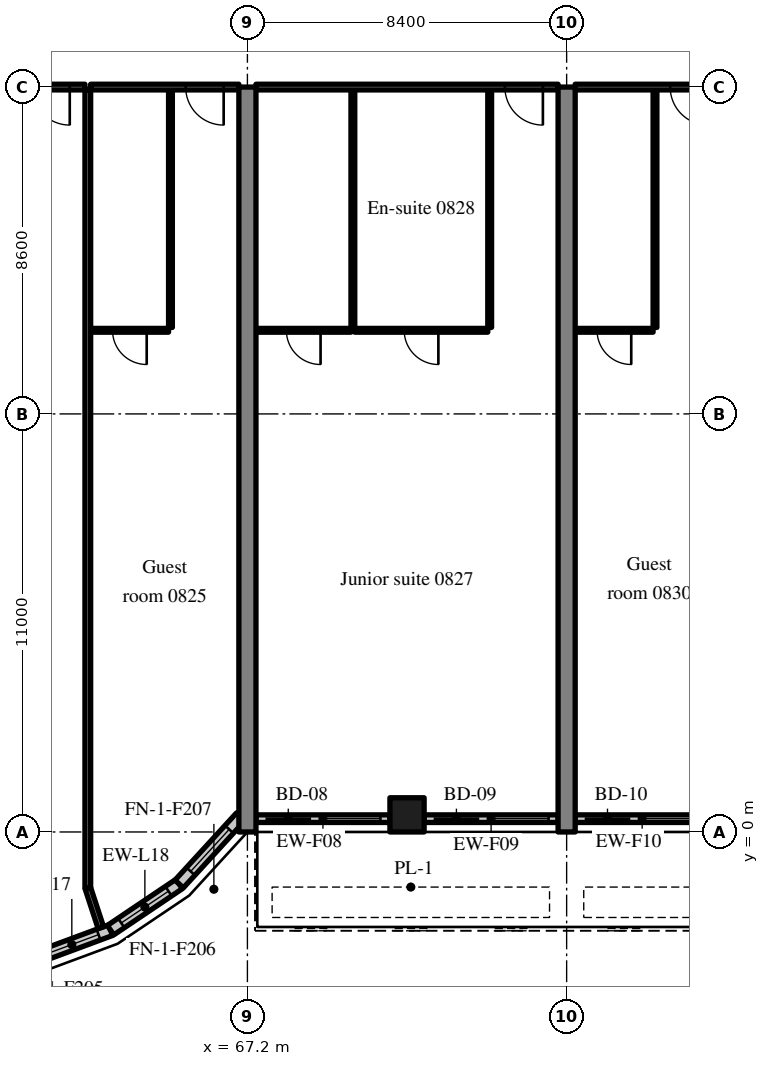
"""IFC4 building model, lengths in metres.
Left out: names, types, materials, properties, quantities, classifications, styles, units other than length and angle.
Written with IfcOpenShell. Run it as: python <this file> out.ifc"""

import sys

from ifc_helpers import new_model, si_unit, direction, frame, frame_2d, origin, origin_2d, place, context, subcontext, project, spatial, rectangle, extrude, source, transform, mapped, element, fill, save


model = new_model("IFC4")
c1 = context("Model", 3, precision=1e-05, world=origin(), true_north=direction((0.0, 1.0)))
c2 = subcontext(c1, "Body", "Model", "MODEL_VIEW")
j1 = project(units=[si_unit("LENGTHUNIT", "METRE"), si_unit("PLANEANGLEUNIT", "RADIAN")], contexts=[c1])
p1 = place(None, origin())
s1 = spatial("IfcSite", under=j1, at=p1, CompositionType="ELEMENT")
p2 = place(p1, origin())
s2 = spatial("IfcBuilding", under=s1, at=p2, CompositionType="ELEMENT")
p3 = place(p2, frame((0.0, 0.0, 39.2)))
s3 = spatial("IfcBuildingStorey", under=s2, at=p3, CompositionType="ELEMENT", Elevation=39.2)
m1 = source(origin(), c2, "Body", "SweptSolid", [
    extrude(rectangle(XDim=19.6, YDim=0.45, at=frame_2d((9.8, 0.0))), origin(), (0.0, 0.0, 1.0), 3.52),
])
for number, where, z_axis, x_axis in (
    (1, (67.2, 0.0, 0.0), (0.0, 0.0, 1.0), (0.0, 1.0, 0.0)),
    (2, (75.6, 0.0, 0.0), (0.0, 0.0, 1.0), (0.0, 1.0, 0.0)),
):
    element("IfcWall", number, at=place(p3, frame(where, z_axis=z_axis, x_axis=x_axis)), inside=s3, PredefinedType="SHEAR", context=c2, shape_type="MappedRepresentation", body=[
        mapped(m1, transform((0.0, 0.0, 0.0), scale=1.0)),
    ])
m2 = source(origin(), c2, "Body", "SweptSolid", [
    extrude(rectangle(XDim=0.9, YDim=0.9, at=origin_2d()), origin(), (0.0, 0.0, 1.0), 3.52),
])
p4 = place(p3, frame((71.4, 0.45, 0.0), z_axis=(0.0, 0.0, 1.0), x_axis=(1.0, 0.0, 0.0)))
e3 = element("IfcColumn", 3, at=p4, inside=s3, PredefinedType="COLUMN", context=c2, shape_type="MappedRepresentation", body=[
    mapped(m2, transform((0.0, 0.0, 0.0), scale=1.0)),
])
m3 = source(origin(), c2, "Body", "SweptSolid", [
    extrude(rectangle(XDim=2.176, YDim=0.3, at=frame_2d((1.088, 0.0))), origin(), (0.0, 0.0, 1.0), 3.52),
])
p5 = place(p3, frame((61.56, -3.34, 0.0), z_axis=(0.0, 0.0, 1.0), x_axis=(0.937531979054, 0.347899106424, 0.0)))
e4 = element("IfcWall", 4, at=p5, inside=s3, PredefinedType="SOLIDWALL", context=c2, shape_type="MappedRepresentation", body=[
    mapped(m3, transform((0.0, 0.0, 0.0), scale=1.0)),
])
m4 = source(origin(), c2, "Body", "SweptSolid", [
    extrude(rectangle(XDim=1.5, YDim=2.0, at=frame_2d((0.75, 1.0))), frame((0.0, 0.16, 0.0), z_axis=(0.0, -1.0, 0.0), x_axis=(1.0, 0.0, 0.0)), (0.0, 0.0, 1.0), 0.32),
])
p6 = place(p5, frame((0.338, 0.0, 0.9)))
e5 = element("IfcOpeningElement", 5, at=p6, cuts=e4, PredefinedType="OPENING", context=c2, shape_type="MappedRepresentation", body=[
    mapped(m4, transform((0.0, 0.0, 0.0), scale=1.0)),
])
m5 = source(origin(), c2, "Body", "SweptSolid", [
    extrude(rectangle(XDim=2.176, YDim=0.3, at=frame_2d((1.088, 0.0))), origin(), (0.0, 0.0, 1.0), 3.52),
])
p7 = place(p3, frame((63.599, -2.583, 0.0), z_axis=(0.0, 0.0, 1.0), x_axis=(0.829625727223, 0.558319937607, 0.0)))
e6 = element("IfcWall", 6, at=p7, inside=s3, PredefinedType="SOLIDWALL", context=c2, shape_type="MappedRepresentation", body=[
    mapped(m5, transform((0.0, 0.0, 0.0), scale=1.0)),
])
p8 = place(p7, frame((0.338, 0.0, 0.9)))
e7 = element("IfcOpeningElement", 7, at=p8, cuts=e6, PredefinedType="OPENING", context=c2, shape_type="MappedRepresentation", body=[
    mapped(m4, transform((0.0, 0.0, 0.0), scale=1.0)),
])
m6 = source(origin(), c2, "Body", "SweptSolid", [
    extrude(rectangle(XDim=2.398, YDim=0.3, at=frame_2d((1.199, 0.0))), origin(), (0.0, 0.0, 1.0), 3.52),
])
p9 = place(p3, frame((65.404, -1.369, 0.0), z_axis=(0.0, 0.0, 1.0), x_axis=(0.675374189419, 0.737475222815, 0.0)))
e8 = element("IfcWall", 8, at=p9, inside=s3, PredefinedType="SOLIDWALL", context=c2, shape_type="MappedRepresentation", body=[
    mapped(m6, transform((0.0, 0.0, 0.0), scale=1.0)),
])
p10 = place(p9, frame((0.449, 0.0, 0.9)))
e9 = element("IfcOpeningElement", 9, at=p10, cuts=e8, PredefinedType="OPENING", context=c2, shape_type="MappedRepresentation", body=[
    mapped(m4, transform((0.0, 0.0, 0.0), scale=1.0)),
])
m7 = source(origin(), c2, "Body", "SweptSolid", [
    extrude(rectangle(XDim=3.525, YDim=0.2, at=frame_2d((1.762, 0.0))), origin(), (0.0, 0.0, 1.0), 2.77),
])
p11 = place(p3, frame((67.425, 0.35, 0.0), z_axis=(0.0, 0.0, 1.0), x_axis=(1.0, 0.0, 0.0)))
e10 = element("IfcWall", 10, at=p11, inside=s3, PredefinedType="SOLIDWALL", context=c2, shape_type="MappedRepresentation", body=[
    mapped(m7, transform((0.0, 0.0, 0.0), scale=1.0)),
])
m8 = source(origin(), c2, "Body", "SweptSolid", [
    extrude(rectangle(XDim=1.2, YDim=2.4, at=frame_2d((0.6, 1.2))), frame((0.0, 0.11, 0.0), z_axis=(0.0, -1.0, 0.0), x_axis=(1.0, 0.0, 0.0)), (0.0, 0.0, 1.0), 0.22),
])
p12 = place(p11, frame((0.25, 0.0, 0.0)))
e11 = element("IfcOpeningElement", 11, at=p12, cuts=e10, PredefinedType="OPENING", context=c2, shape_type="MappedRepresentation", body=[
    mapped(m8, transform((0.0, 0.0, 0.0), scale=1.0)),
])
m9 = source(origin(), c2, "Body", "SweptSolid", [
    extrude(rectangle(XDim=1.5, YDim=1.5, at=frame_2d((0.75, 0.75))), frame((0.0, 0.11, 0.0), z_axis=(0.0, -1.0, 0.0), x_axis=(1.0, 0.0, 0.0)), (0.0, 0.0, 1.0), 0.22),
])
p13 = place(p11, frame((1.775, 0.0, 0.9)))
e12 = element("IfcOpeningElement", 12, at=p13, cuts=e10, PredefinedType="OPENING", context=c2, shape_type="MappedRepresentation", body=[
    mapped(m9, transform((0.0, 0.0, 0.0), scale=1.0)),
])
p14 = place(p3, frame((71.85, 0.35, 0.0), z_axis=(0.0, 0.0, 1.0), x_axis=(1.0, 0.0, 0.0)))
e13 = element("IfcWall", 13, at=p14, inside=s3, PredefinedType="SOLIDWALL", context=c2, shape_type="MappedRepresentation", body=[
    mapped(m7, transform((0.0, 0.0, 0.0), scale=1.0)),
])
p15 = place(p14, frame((0.25, 0.0, 0.0)))
e14 = element("IfcOpeningElement", 14, at=p15, cuts=e13, PredefinedType="OPENING", context=c2, shape_type="MappedRepresentation", body=[
    mapped(m8, transform((0.0, 0.0, 0.0), scale=1.0)),
])
p16 = place(p14, frame((1.775, 0.0, 0.9)))
e15 = element("IfcOpeningElement", 15, at=p16, cuts=e13, PredefinedType="OPENING", context=c2, shape_type="MappedRepresentation", body=[
    mapped(m9, transform((0.0, 0.0, 0.0), scale=1.0)),
])
m10 = source(origin(), c2, "Body", "SweptSolid", [
    extrude(rectangle(XDim=3.525, YDim=0.2, at=frame_2d((1.763, 0.0))), origin(), (0.0, 0.0, 1.0), 2.77),
])
p17 = place(p3, frame((75.825, 0.35, 0.0), z_axis=(0.0, 0.0, 1.0), x_axis=(1.0, 0.0, 0.0)))
e16 = element("IfcWall", 16, at=p17, inside=s3, PredefinedType="SOLIDWALL", context=c2, shape_type="MappedRepresentation", body=[
    mapped(m10, transform((0.0, 0.0, 0.0), scale=1.0)),
])
p18 = place(p17, frame((0.25, 0.0, 0.0)))
e17 = element("IfcOpeningElement", 17, at=p18, cuts=e16, PredefinedType="OPENING", context=c2, shape_type="MappedRepresentation", body=[
    mapped(m8, transform((0.0, 0.0, 0.0), scale=1.0)),
])
p19 = place(p17, frame((1.775, 0.0, 0.9)))
e18 = element("IfcOpeningElement", 18, at=p19, cuts=e16, PredefinedType="OPENING", context=c2, shape_type="MappedRepresentation", body=[
    mapped(m9, transform((0.0, 0.0, 0.0), scale=1.0)),
])
m11 = source(origin(), c2, "Body", "SweptSolid", [
    extrude(rectangle(XDim=3.9, YDim=0.15, at=frame_2d((1.95, 0.0))), origin(), (0.0, 0.0, 1.0), 2.82),
])
p20 = place(p3, frame((59.025, 19.6, 0.0), z_axis=(0.0, 0.0, 1.0), x_axis=(1.0, 0.0, 0.0)))
e19 = element("IfcWall", 19, at=p20, inside=s3, PredefinedType="PARTITIONING", context=c2, shape_type="MappedRepresentation", body=[
    mapped(m11, transform((0.0, 0.0, 0.0), scale=1.0)),
])
m12 = source(origin(), c2, "Body", "SweptSolid", [
    extrude(rectangle(XDim=1.0, YDim=2.1, at=frame_2d((0.5, 1.05))), frame((0.0, 0.085, 0.0), z_axis=(0.0, -1.0, 0.0), x_axis=(1.0, 0.0, 0.0)), (0.0, 0.0, 1.0), 0.17),
])
p21 = place(p20, frame((2.5, 0.0, 0.0)))
e20 = element("IfcOpeningElement", 20, at=p21, cuts=e19, PredefinedType="OPENING", context=c2, shape_type="MappedRepresentation", body=[
    mapped(m12, transform((0.0, 0.0, 0.0), scale=1.0)),
])
m13 = source(origin(), c2, "Body", "SweptSolid", [
    extrude(rectangle(XDim=6.25, YDim=0.1, at=frame_2d((3.125, 0.0))), origin(), (0.0, 0.0, 1.0), 3.52),
])
p22 = place(p3, frame((65.175, 13.275, 0.0), z_axis=(0.0, 0.0, 1.0), x_axis=(0.0, 1.0, 0.0)))
e21 = element("IfcWall", 21, at=p22, inside=s3, PredefinedType="PARTITIONING", context=c2, shape_type="MappedRepresentation", body=[
    mapped(m13, transform((0.0, 0.0, 0.0), scale=1.0)),
])
m14 = source(origin(), c2, "Body", "SweptSolid", [
    extrude(rectangle(XDim=2.05, YDim=0.1, at=frame_2d((1.025, 0.0))), origin(), (0.0, 0.0, 1.0), 3.52),
])
p23 = place(p3, frame((63.075, 13.2, 0.0), z_axis=(0.0, 0.0, 1.0), x_axis=(1.0, 0.0, 0.0)))
e22 = element("IfcWall", 22, at=p23, inside=s3, PredefinedType="PARTITIONING", context=c2, shape_type="MappedRepresentation", body=[
    mapped(m14, transform((0.0, 0.0, 0.0), scale=1.0)),
])
m15 = source(origin(), c2, "Body", "SweptSolid", [
    extrude(rectangle(XDim=0.9, YDim=2.1, at=frame_2d((0.45, 1.05))), frame((0.0, 0.06, 0.0), z_axis=(0.0, -1.0, 0.0), x_axis=(1.0, 0.0, 0.0)), (0.0, 0.0, 1.0), 0.12),
])
p24 = place(p23, frame((0.575, 0.0, 0.0)))
e23 = element("IfcOpeningElement", 23, at=p24, cuts=e22, PredefinedType="OPENING", context=c2, shape_type="MappedRepresentation", body=[
    mapped(m15, transform((0.0, 0.0, 0.0), scale=1.0)),
])
p25 = place(p3, frame((63.075, 19.6, 0.0), z_axis=(0.0, 0.0, 1.0), x_axis=(1.0, 0.0, 0.0)))
e24 = element("IfcWall", 24, at=p25, inside=s3, PredefinedType="PARTITIONING", context=c2, shape_type="MappedRepresentation", body=[
    mapped(m11, transform((0.0, 0.0, 0.0), scale=1.0)),
])
p26 = place(p25, frame((2.5, 0.0, 0.0)))
e25 = element("IfcOpeningElement", 25, at=p26, cuts=e24, PredefinedType="OPENING", context=c2, shape_type="MappedRepresentation", body=[
    mapped(m12, transform((0.0, 0.0, 0.0), scale=1.0)),
])
m16 = source(origin(), c2, "Body", "SweptSolid", [
    extrude(rectangle(XDim=20.998, YDim=0.15, at=frame_2d((10.499, 0.0))), origin(), (0.0, 0.0, 1.0), 3.52),
])
p27 = place(p3, frame((63.0, -1.473, 0.0), z_axis=(0.0, 0.0, 1.0), x_axis=(0.0, 1.0, 0.0)))
e26 = element("IfcWall", 26, at=p27, inside=s3, PredefinedType="PARTITIONING", context=c2, shape_type="MappedRepresentation", body=[
    mapped(m16, transform((0.0, 0.0, 0.0), scale=1.0)),
])
for number, where, z_axis, x_axis in (
    (27, (73.575, 13.275, 0.0), (0.0, 0.0, 1.0), (0.0, 1.0, 0.0)),
    (28, (69.975, 13.275, 0.0), (0.0, 0.0, 1.0), (0.0, 1.0, 0.0)),
):
    element("IfcWall", number, at=place(p3, frame(where, z_axis=z_axis, x_axis=x_axis)), inside=s3, PredefinedType="PARTITIONING", context=c2, shape_type="MappedRepresentation", body=[
        mapped(m13, transform((0.0, 0.0, 0.0), scale=1.0)),
    ])
m17 = source(origin(), c2, "Body", "SweptSolid", [
    extrude(rectangle(XDim=3.5, YDim=0.1, at=frame_2d((1.75, 0.0))), origin(), (0.0, 0.0, 1.0), 3.52),
])
p28 = place(p3, frame((70.025, 13.2, 0.0), z_axis=(0.0, 0.0, 1.0), x_axis=(1.0, 0.0, 0.0)))
e29 = element("IfcWall", 29, at=p28, inside=s3, PredefinedType="PARTITIONING", context=c2, shape_type="MappedRepresentation", body=[
    mapped(m17, transform((0.0, 0.0, 0.0), scale=1.0)),
])
p29 = place(p28, frame((1.3, 0.0, 0.0)))
e30 = element("IfcOpeningElement", 30, at=p29, cuts=e29, PredefinedType="OPENING", context=c2, shape_type="MappedRepresentation", body=[
    mapped(m15, transform((0.0, 0.0, 0.0), scale=1.0)),
])
m18 = source(origin(), c2, "Body", "SweptSolid", [
    extrude(rectangle(XDim=2.5, YDim=0.1, at=frame_2d((1.25, 0.0))), origin(), (0.0, 0.0, 1.0), 3.52),
])
p30 = place(p3, frame((67.425, 13.2, 0.0), z_axis=(0.0, 0.0, 1.0), x_axis=(1.0, 0.0, 0.0)))
e31 = element("IfcWall", 31, at=p30, inside=s3, PredefinedType="PARTITIONING", context=c2, shape_type="MappedRepresentation", body=[
    mapped(m18, transform((0.0, 0.0, 0.0), scale=1.0)),
])
p31 = place(p30, frame((0.8, 0.0, 0.0)))
e32 = element("IfcOpeningElement", 32, at=p31, cuts=e31, PredefinedType="OPENING", context=c2, shape_type="MappedRepresentation", body=[
    mapped(m15, transform((0.0, 0.0, 0.0), scale=1.0)),
])
m19 = source(origin(), c2, "Body", "SweptSolid", [
    extrude(rectangle(XDim=7.95, YDim=0.15, at=frame_2d((3.975, 0.0))), origin(), (0.0, 0.0, 1.0), 2.82),
])
p32 = place(p3, frame((67.425, 19.6, 0.0), z_axis=(0.0, 0.0, 1.0), x_axis=(1.0, 0.0, 0.0)))
e33 = element("IfcWall", 33, at=p32, inside=s3, PredefinedType="PARTITIONING", context=c2, shape_type="MappedRepresentation", body=[
    mapped(m19, transform((0.0, 0.0, 0.0), scale=1.0)),
])
p33 = place(p32, frame((6.55, 0.0, 0.0)))
e34 = element("IfcOpeningElement", 34, at=p33, cuts=e33, PredefinedType="OPENING", context=c2, shape_type="MappedRepresentation", body=[
    mapped(m12, transform((0.0, 0.0, 0.0), scale=1.0)),
])
p34 = place(p3, frame((77.925, 13.275, 0.0), z_axis=(0.0, 0.0, 1.0), x_axis=(0.0, 1.0, 0.0)))
e35 = element("IfcWall", 35, at=p34, inside=s3, PredefinedType="PARTITIONING", context=c2, shape_type="MappedRepresentation", body=[
    mapped(m13, transform((0.0, 0.0, 0.0), scale=1.0)),
])
p35 = place(p3, frame((75.825, 13.2, 0.0), z_axis=(0.0, 0.0, 1.0), x_axis=(1.0, 0.0, 0.0)))
e36 = element("IfcWall", 36, at=p35, inside=s3, PredefinedType="PARTITIONING", context=c2, shape_type="MappedRepresentation", body=[
    mapped(m14, transform((0.0, 0.0, 0.0), scale=1.0)),
])
p36 = place(p35, frame((0.575, 0.0, 0.0)))
e37 = element("IfcOpeningElement", 37, at=p36, cuts=e36, PredefinedType="OPENING", context=c2, shape_type="MappedRepresentation", body=[
    mapped(m15, transform((0.0, 0.0, 0.0), scale=1.0)),
])
p37 = place(p3, frame((75.825, 19.6, 0.0), z_axis=(0.0, 0.0, 1.0), x_axis=(1.0, 0.0, 0.0)))
e38 = element("IfcWall", 38, at=p37, inside=s3, PredefinedType="PARTITIONING", context=c2, shape_type="MappedRepresentation", body=[
    mapped(m11, transform((0.0, 0.0, 0.0), scale=1.0)),
])
p38 = place(p37, frame((2.5, 0.0, 0.0)))
e39 = element("IfcOpeningElement", 39, at=p38, cuts=e38, PredefinedType="OPENING", context=c2, shape_type="MappedRepresentation", body=[
    mapped(m12, transform((0.0, 0.0, 0.0), scale=1.0)),
])
m20 = source(origin(), c2, "Body", "SweptSolid", [
    extrude(rectangle(XDim=1.101, YDim=0.15, at=frame_2d((0.55, 0.0))), origin(), (0.0, 0.0, 1.0), 3.52),
])
p39 = place(p3, frame((63.343, -2.519, 0.0), z_axis=(0.0, 0.0, 1.0), x_axis=(-0.311567081539, 0.950224159712, 0.0)))
e40 = element("IfcWall", 40, at=p39, inside=s3, PredefinedType="PARTITIONING", context=c2, shape_type="MappedRepresentation", body=[
    mapped(m20, transform((0.0, 0.0, 0.0), scale=1.0)),
])
m21 = source(origin(), c2, "Body", "SweptSolid", [
    extrude(rectangle(XDim=1.5, YDim=2.0, at=frame_2d((0.75, 1.0))), frame((0.0, 0.03, 0.0), z_axis=(0.0, -1.0, 0.0), x_axis=(1.0, 0.0, 0.0)), (0.0, 0.0, 1.0), 0.06),
])
p40 = place(p6, origin())
e41 = element("IfcWindow", 41, at=p40, inside=s3, PartitioningType="SINGLE_PANEL", PredefinedType="WINDOW", context=c2, shape_type="MappedRepresentation", body=[
    mapped(m21, transform((0.0, 0.0, 0.0), scale=1.0)),
])
fill(e5, e41)
p41 = place(p8, origin())
e42 = element("IfcWindow", 42, at=p41, inside=s3, PartitioningType="SINGLE_PANEL", PredefinedType="WINDOW", context=c2, shape_type="MappedRepresentation", body=[
    mapped(m21, transform((0.0, 0.0, 0.0), scale=1.0)),
])
fill(e7, e42)
p42 = place(p10, origin())
e43 = element("IfcWindow", 43, at=p42, inside=s3, PartitioningType="SINGLE_PANEL", PredefinedType="WINDOW", context=c2, shape_type="MappedRepresentation", body=[
    mapped(m21, transform((0.0, 0.0, 0.0), scale=1.0)),
])
fill(e9, e43)
m22 = source(origin(), c2, "Body", "SweptSolid", [
    extrude(rectangle(XDim=1.2, YDim=2.4, at=frame_2d((0.6, 1.2))), frame((0.0, 0.025, 0.0), z_axis=(0.0, -1.0, 0.0), x_axis=(1.0, 0.0, 0.0)), (0.0, 0.0, 1.0), 0.05),
])
p43 = place(p12, origin())
e44 = element("IfcDoor", 44, at=p43, inside=s3, OperationType="SLIDING_TO_RIGHT", PredefinedType="DOOR", context=c2, shape_type="MappedRepresentation", body=[
    mapped(m22, transform((0.0, 0.0, 0.0), scale=1.0)),
])
fill(e11, e44)
m23 = source(origin(), c2, "Body", "SweptSolid", [
    extrude(rectangle(XDim=1.5, YDim=1.5, at=frame_2d((0.75, 0.75))), frame((0.0, 0.03, 0.0), z_axis=(0.0, -1.0, 0.0), x_axis=(1.0, 0.0, 0.0)), (0.0, 0.0, 1.0), 0.06),
])
p44 = place(p13, origin())
e45 = element("IfcWindow", 45, at=p44, inside=s3, PartitioningType="SINGLE_PANEL", PredefinedType="WINDOW", context=c2, shape_type="MappedRepresentation", body=[
    mapped(m23, transform((0.0, 0.0, 0.0), scale=1.0)),
])
fill(e12, e45)
p45 = place(p15, origin())
e46 = element("IfcDoor", 46, at=p45, inside=s3, OperationType="SLIDING_TO_LEFT", PredefinedType="DOOR", context=c2, shape_type="MappedRepresentation", body=[
    mapped(m22, transform((0.0, 0.0, 0.0), scale=1.0)),
])
fill(e14, e46)
p46 = place(p16, origin())
e47 = element("IfcWindow", 47, at=p46, inside=s3, PartitioningType="SINGLE_PANEL", PredefinedType="WINDOW", context=c2, shape_type="MappedRepresentation", body=[
    mapped(m23, transform((0.0, 0.0, 0.0), scale=1.0)),
])
fill(e15, e47)
p47 = place(p18, origin())
e48 = element("IfcDoor", 48, at=p47, inside=s3, OperationType="SLIDING_TO_RIGHT", PredefinedType="DOOR", context=c2, shape_type="MappedRepresentation", body=[
    mapped(m22, transform((0.0, 0.0, 0.0), scale=1.0)),
])
fill(e17, e48)
p48 = place(p19, origin())
e49 = element("IfcWindow", 49, at=p48, inside=s3, PartitioningType="SINGLE_PANEL", PredefinedType="WINDOW", context=c2, shape_type="MappedRepresentation", body=[
    mapped(m23, transform((0.0, 0.0, 0.0), scale=1.0)),
])
fill(e18, e49)
m24 = source(origin(), c2, "Body", "SweptSolid", [
    extrude(rectangle(XDim=1.0, YDim=2.1, at=frame_2d((0.5, 1.05))), frame((0.0, 0.025, 0.0), z_axis=(0.0, -1.0, 0.0), x_axis=(1.0, 0.0, 0.0)), (0.0, 0.0, 1.0), 0.05),
])
p49 = place(p21, origin())
e50 = element("IfcDoor", 50, at=p49, inside=s3, OperationType="SINGLE_SWING_RIGHT", PredefinedType="DOOR", context=c2, shape_type="MappedRepresentation", body=[
    mapped(m24, transform((0.0, 0.0, 0.0), scale=1.0)),
])
fill(e20, e50)
m25 = source(origin(), c2, "Body", "SweptSolid", [
    extrude(rectangle(XDim=0.9, YDim=2.1, at=frame_2d((0.45, 1.05))), frame((0.0, 0.025, 0.0), z_axis=(0.0, -1.0, 0.0), x_axis=(1.0, 0.0, 0.0)), (0.0, 0.0, 1.0), 0.05),
])
p50 = place(p24, origin())
e51 = element("IfcDoor", 51, at=p50, inside=s3, OperationType="SINGLE_SWING_RIGHT", PredefinedType="DOOR", context=c2, shape_type="MappedRepresentation", body=[
    mapped(m25, transform((0.0, 0.0, 0.0), scale=1.0)),
])
fill(e23, e51)
p51 = place(p26, origin())
e52 = element("IfcDoor", 52, at=p51, inside=s3, OperationType="SINGLE_SWING_RIGHT", PredefinedType="DOOR", context=c2, shape_type="MappedRepresentation", body=[
    mapped(m24, transform((0.0, 0.0, 0.0), scale=1.0)),
])
fill(e25, e52)
p52 = place(p29, origin())
e53 = element("IfcDoor", 53, at=p52, inside=s3, OperationType="SINGLE_SWING_RIGHT", PredefinedType="DOOR", context=c2, shape_type="MappedRepresentation", body=[
    mapped(m25, transform((0.0, 0.0, 0.0), scale=1.0)),
])
fill(e30, e53)
p53 = place(p31, origin())
e54 = element("IfcDoor", 54, at=p53, inside=s3, OperationType="SINGLE_SWING_RIGHT", PredefinedType="DOOR", context=c2, shape_type="MappedRepresentation", body=[
    mapped(m25, transform((0.0, 0.0, 0.0), scale=1.0)),
])
fill(e32, e54)
p54 = place(p33, origin())
e55 = element("IfcDoor", 55, at=p54, inside=s3, OperationType="SINGLE_SWING_RIGHT", PredefinedType="DOOR", context=c2, shape_type="MappedRepresentation", body=[
    mapped(m24, transform((0.0, 0.0, 0.0), scale=1.0)),
])
fill(e34, e55)
p55 = place(p36, origin())
e56 = element("IfcDoor", 56, at=p55, inside=s3, OperationType="SINGLE_SWING_RIGHT", PredefinedType="DOOR", context=c2, shape_type="MappedRepresentation", body=[
    mapped(m25, transform((0.0, 0.0, 0.0), scale=1.0)),
])
fill(e37, e56)
p56 = place(p38, origin())
e57 = element("IfcDoor", 57, at=p56, inside=s3, OperationType="SINGLE_SWING_RIGHT", PredefinedType="DOOR", context=c2, shape_type="MappedRepresentation", body=[
    mapped(m24, transform((0.0, 0.0, 0.0), scale=1.0)),
])
fill(e39, e57)
save(model, sys.argv[1])
